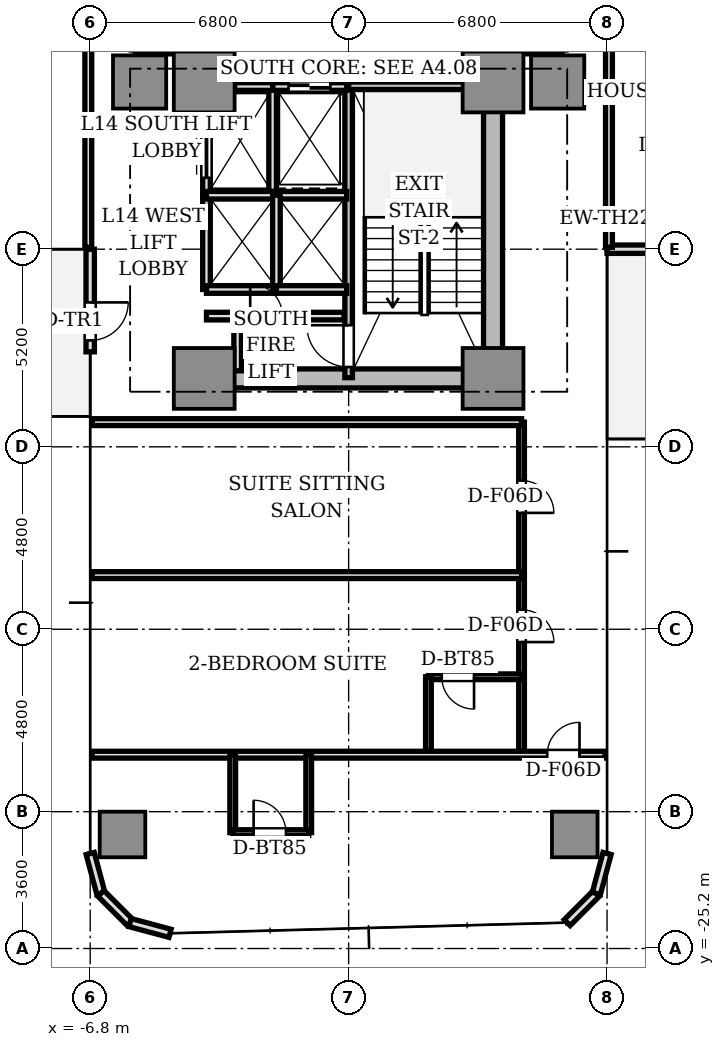
"""IFC4 building model, lengths in metres.
Left out: names, types, materials, properties, quantities, classifications, styles, units other than length and angle.
Written with IfcOpenShell. Run it as: python <this file> out.ifc"""

import sys

from ifc_helpers import new_model, si_unit, direction, frame, frame_2d, origin, origin_2d, place, context, subcontext, project, spatial, rectangle, extrude, source, transform, mapped, element, fill, save


model = new_model("IFC4")
c1 = context("Model", 3, precision=1e-05, world=origin(), true_north=direction((0.0, 1.0)))
c2 = subcontext(c1, "Body", "Model", "MODEL_VIEW")
j1 = project(units=[si_unit("LENGTHUNIT", "METRE"), si_unit("PLANEANGLEUNIT", "RADIAN")], contexts=[c1])
p1 = place(None, origin())
s1 = spatial("IfcSite", under=j1, at=p1, CompositionType="ELEMENT")
p2 = place(p1, origin())
s2 = spatial("IfcBuilding", under=s1, at=p2, CompositionType="ELEMENT")
p3 = place(p2, frame((0.0, 0.0, 54.4)))
s3 = spatial("IfcBuildingStorey", under=s2, at=p3, CompositionType="ELEMENT", Elevation=54.4)
p4 = place(p3, frame((-3.55, -10.2, 0.0), z_axis=(0.0, 0.0, 1.0), x_axis=(1.0, 0.0, 0.0)))
e1 = element("IfcWall", 1, at=p4, inside=s3, PredefinedType="SHEAR", context=c2, shape_type="SweptSolid", body=[
    extrude(rectangle(XDim=7.1, YDim=0.5, at=frame_2d((3.55, 0.0))), origin(), (0.0, 0.0, 1.0), 3.11),
])
p5 = place(p3, frame((3.8, -9.75, 0.0), z_axis=(0.0, 0.0, 1.0), x_axis=(0.0, 1.0, 0.0)))
e2 = element("IfcWall", 2, at=p5, inside=s3, PredefinedType="SHEAR", context=c2, shape_type="SweptSolid", body=[
    extrude(rectangle(XDim=6.9, YDim=0.5, at=frame_2d((3.45, 0.0))), origin(), (0.0, 0.0, 1.0), 3.11),
])
m1 = source(origin(), c2, "Body", "SweptSolid", [
    extrude(rectangle(XDim=1.6, YDim=1.6, at=origin_2d()), origin(), (0.0, 0.0, 1.0), 3.11),
])
for number, where, z_axis, x_axis in (
    (3, (-3.8, -2.4, 0.0), (0.0, 0.0, 1.0), (1.0, 0.0, 0.0)),
    (4, (3.8, -2.4, 0.0), (0.0, 0.0, 1.0), (1.0, 0.0, 0.0)),
    (5, (-3.8, -10.2, 0.0), (0.0, 0.0, 1.0), (1.0, 0.0, 0.0)),
    (6, (3.8, -10.2, 0.0), (0.0, 0.0, 1.0), (1.0, 0.0, 0.0)),
):
    element("IfcColumn", number, at=place(p3, frame(where, z_axis=z_axis, x_axis=x_axis)), inside=s3, PredefinedType="COLUMN", context=c2, shape_type="MappedRepresentation", body=[
        mapped(m1, transform((0.0, 0.0, 0.0), scale=1.0)),
    ])
m2 = source(origin(), c2, "Body", "SweptSolid", [
    extrude(rectangle(XDim=1.4, YDim=1.4, at=origin_2d()), origin(), (0.0, 0.0, 1.0), 3.11),
])
for number, where, z_axis, x_axis in (
    (7, (5.5, -2.4, 0.0), (0.0, 0.0, 1.0), (1.0, 0.0, 0.0)),
    (8, (-5.5, -2.4, 0.0), (0.0, 0.0, 1.0), (1.0, 0.0, 0.0)),
):
    element("IfcColumn", number, at=place(p3, frame(where, z_axis=z_axis, x_axis=x_axis)), inside=s3, PredefinedType="COLUMN", context=c2, shape_type="MappedRepresentation", body=[
        mapped(m2, transform((0.0, 0.0, 0.0), scale=1.0)),
    ])
m3 = source(origin(), c2, "Body", "SweptSolid", [
    extrude(rectangle(XDim=1.2, YDim=1.2, at=origin_2d()), origin(), (0.0, 0.0, 1.0), 3.11),
])
for number, where, z_axis, x_axis in (
    (9, (-5.95, -22.2, 0.0), (0.0, 0.0, 1.0), (1.0, 0.0, 0.0)),
    (10, (5.95, -22.2, 0.0), (0.0, 0.0, 1.0), (1.0, 0.0, 0.0)),
):
    element("IfcColumn", number, at=place(p3, frame(where, z_axis=z_axis, x_axis=x_axis)), inside=s3, PredefinedType="COLUMN", context=c2, shape_type="MappedRepresentation", body=[
        mapped(m3, transform((0.0, 0.0, 0.0), scale=1.0)),
    ])
p6 = place(p3, frame((6.8, -6.8, 0.0), z_axis=(0.0, 0.0, 1.0), x_axis=(1.0, 0.0, 0.0)))
e11 = element("IfcWall", 11, at=p6, inside=s3, PredefinedType="STANDARD", context=c2, shape_type="SweptSolid", body=[
    extrude(rectangle(XDim=2.7, YDim=0.22, at=frame_2d((1.35, 0.0))), origin(), (0.0, 0.0, 1.0), 3.11),
])
p7 = place(p6, frame((1.4, 0.0, 0.0)))
e12 = element("IfcOpeningElement", 12, at=p7, cuts=e11, PredefinedType="OPENING", context=c2, shape_type="SweptSolid", body=[
    extrude(rectangle(XDim=1.0, YDim=2.2, at=frame_2d((0.5, 1.1))), frame((0.0, 0.12, 0.0), z_axis=(0.0, -1.0, 0.0), x_axis=(1.0, 0.0, 0.0)), (0.0, 0.0, 1.0), 0.24),
])
p8 = place(p3, frame((-6.8, -6.8, 0.0), z_axis=(0.0, 0.0, 1.0), x_axis=(0.0, -1.0, 0.0)))
e13 = element("IfcWall", 13, at=p8, inside=s3, PredefinedType="STANDARD", context=c2, shape_type="SweptSolid", body=[
    extrude(rectangle(XDim=2.7, YDim=0.22, at=frame_2d((1.35, 0.0))), origin(), (0.0, 0.0, 1.0), 3.11),
])
p9 = place(p8, frame((1.4, 0.0, 0.0)))
e14 = element("IfcOpeningElement", 14, at=p9, cuts=e13, PredefinedType="OPENING", context=c2, shape_type="SweptSolid", body=[
    extrude(rectangle(XDim=1.0, YDim=2.2, at=frame_2d((0.5, 1.1))), frame((0.0, 0.12, 0.0), z_axis=(0.0, -1.0, 0.0), x_axis=(1.0, 0.0, 0.0)), (0.0, 0.0, 1.0), 0.24),
])
for number, where, z_axis, x_axis in (
    (15, (-6.8, -22.7, 0.0), (0.0, 0.0, 1.0), (0.259, -0.966, 0.0)),
    (16, (-6.519, -23.75, 0.0), (0.0, 0.0, 1.0), (0.707, -0.707, 0.0)),
    (17, (-5.75, -24.519, 0.0), (0.0, 0.0, 1.0), (0.966, -0.259, 0.0)),
    (18, (5.75, -24.519, 0.0), (0.0, 0.0, 1.0), (0.707, 0.707, 0.0)),
    (19, (6.519, -23.75, 0.0), (0.0, 0.0, 1.0), (0.259, 0.966, 0.0)),
):
    element("IfcWall", number, at=place(p3, frame(where, z_axis=z_axis, x_axis=x_axis)), inside=s3, PredefinedType="STANDARD", context=c2, shape_type="SweptSolid", body=[
        extrude(rectangle(XDim=1.087, YDim=0.22, at=frame_2d((0.543, 0.0))), origin(), (0.0, 0.0, 1.0), 3.11),
    ])
p10 = place(p3, frame((0.0, -10.18, 0.0), z_axis=(0.0, 0.0, 1.0), x_axis=(0.0, 1.0, 0.0)))
e20 = element("IfcWall", 20, at=p10, inside=s3, PredefinedType="SOLIDWALL", context=c2, shape_type="SweptSolid", body=[
    extrude(rectangle(XDim=7.68, YDim=0.2, at=frame_2d((3.84, 0.0))), origin(), (0.0, 0.0, 1.0), 3.11),
])
p11 = place(p10, frame((0.28, 0.0, 0.0)))
e21 = element("IfcOpeningElement", 21, at=p11, cuts=e20, PredefinedType="OPENING", context=c2, shape_type="SweptSolid", body=[
    extrude(rectangle(XDim=1.1, YDim=2.15, at=frame_2d((0.55, 1.075))), frame((0.0, 0.11, 0.0), z_axis=(0.0, -1.0, 0.0), x_axis=(1.0, 0.0, 0.0)), (0.0, 0.0, 1.0), 0.22),
])
p12 = place(p3, frame((0.0, -2.5, 0.0), z_axis=(0.0, 0.0, 1.0), x_axis=(1.0, 0.0, 0.0)))
e22 = element("IfcWall", 22, at=p12, inside=s3, PredefinedType="SOLIDWALL", context=c2, shape_type="SweptSolid", body=[
    extrude(rectangle(XDim=3.72, YDim=0.2, at=frame_2d((1.86, 0.0))), origin(), (0.0, 0.0, 1.0), 3.11),
])
p13 = place(p3, frame((-2.0, -5.28, 0.0), z_axis=(0.0, 0.0, 1.0), x_axis=(0.0, 1.0, 0.0)))
e23 = element("IfcWall", 23, at=p13, inside=s3, PredefinedType="SOLIDWALL", context=c2, shape_type="SweptSolid", body=[
    extrude(rectangle(XDim=2.78, YDim=0.2, at=frame_2d((1.39, 0.0))), origin(), (0.0, 0.0, 1.0), 2.66),
])
p14 = place(p3, frame((-2.0, -2.52, 0.0), z_axis=(0.0, 0.0, 1.0), x_axis=(1.0, 0.0, 0.0)))
e24 = element("IfcWall", 24, at=p14, inside=s3, PredefinedType="SOLIDWALL", context=c2, shape_type="SweptSolid", body=[
    extrude(rectangle(XDim=1.95, YDim=0.2, at=frame_2d((0.975, 0.0))), origin(), (0.0, 0.0, 1.0), 2.66),
])
p15 = place(p14, frame((0.42, 0.0, 0.0)))
e25 = element("IfcOpeningElement", 25, at=p15, cuts=e24, PredefinedType="OPENING", context=c2, shape_type="SweptSolid", body=[
    extrude(rectangle(XDim=1.1, YDim=2.2, at=frame_2d((0.55, 1.1))), frame((0.0, 0.11, 0.0), z_axis=(0.0, -1.0, 0.0), x_axis=(1.0, 0.0, 0.0)), (0.0, 0.0, 1.0), 0.22),
])
p16 = place(p3, frame((-3.0, -2.52, 0.0), z_axis=(0.0, 0.0, 1.0), x_axis=(1.0, 0.0, 0.0)))
e26 = element("IfcWall", 26, at=p16, inside=s3, PredefinedType="SOLIDWALL", context=c2, shape_type="SweptSolid", body=[
    extrude(rectangle(XDim=1.0, YDim=0.2, at=frame_2d((0.5, 0.0))), origin(), (0.0, 0.0, 1.0), 2.66),
])
p17 = place(p3, frame((-3.74, -5.36, 0.0), z_axis=(0.0, 0.0, 1.0), x_axis=(0.0, 1.0, 0.0)))
e27 = element("IfcWall", 27, at=p17, inside=s3, PredefinedType="SOLIDWALL", context=c2, shape_type="SweptSolid", body=[
    extrude(rectangle(XDim=2.08, YDim=0.2, at=frame_2d((1.04, 0.0))), origin(), (0.0, 0.0, 1.0), 2.66),
])
p18 = place(p17, frame((0.44, 0.0, 0.0)))
e28 = element("IfcOpeningElement", 28, at=p18, cuts=e27, PredefinedType="OPENING", context=c2, shape_type="SweptSolid", body=[
    extrude(rectangle(XDim=1.2, YDim=2.2, at=frame_2d((0.6, 1.1))), frame((0.0, 0.11, 0.0), z_axis=(0.0, -1.0, 0.0), x_axis=(1.0, 0.0, 0.0)), (0.0, 0.0, 1.0), 0.22),
])
p19 = place(p3, frame((-3.74, -7.86, 0.0), z_axis=(0.0, 0.0, 1.0), x_axis=(0.0, 1.0, 0.0)))
e29 = element("IfcWall", 29, at=p19, inside=s3, PredefinedType="SOLIDWALL", context=c2, shape_type="SweptSolid", body=[
    extrude(rectangle(XDim=2.48, YDim=0.2, at=frame_2d((1.24, 0.0))), origin(), (0.0, 0.0, 1.0), 2.66),
])
p20 = place(p3, frame((-3.74, -7.86, 0.0), z_axis=(0.0, 0.0, 1.0), x_axis=(1.0, 0.0, 0.0)))
e30 = element("IfcWall", 30, at=p20, inside=s3, PredefinedType="SOLIDWALL", context=c2, shape_type="SweptSolid", body=[
    extrude(rectangle(XDim=1.84, YDim=0.2, at=frame_2d((0.92, 0.0))), origin(), (0.0, 0.0, 1.0), 2.66),
])
p21 = place(p3, frame((-3.74, -5.38, 0.0), z_axis=(0.0, 0.0, 1.0), x_axis=(1.0, 0.0, 0.0)))
e31 = element("IfcWall", 31, at=p21, inside=s3, PredefinedType="SOLIDWALL", context=c2, shape_type="SweptSolid", body=[
    extrude(rectangle(XDim=3.69, YDim=0.2, at=frame_2d((1.845, 0.0))), origin(), (0.0, 0.0, 1.0), 2.66),
])
p22 = place(p3, frame((-1.9, -7.86, 0.0), z_axis=(0.0, 0.0, 1.0), x_axis=(0.0, 1.0, 0.0)))
e32 = element("IfcWall", 32, at=p22, inside=s3, PredefinedType="SOLIDWALL", context=c2, shape_type="SweptSolid", body=[
    extrude(rectangle(XDim=2.48, YDim=0.2, at=frame_2d((1.24, 0.0))), origin(), (0.0, 0.0, 1.0), 2.66),
])
p23 = place(p3, frame((-1.9, -7.86, 0.0), z_axis=(0.0, 0.0, 1.0), x_axis=(1.0, 0.0, 0.0)))
e33 = element("IfcWall", 33, at=p23, inside=s3, PredefinedType="SOLIDWALL", context=c2, shape_type="SweptSolid", body=[
    extrude(rectangle(XDim=1.85, YDim=0.2, at=frame_2d((0.925, 0.0))), origin(), (0.0, 0.0, 1.0), 2.66),
])
for number, where, z_axis, x_axis in (
    (34, (3.98, -1.56, 0.0), (0.0, 0.0, 1.0), (1.0, 0.0, 0.0)),
    (35, (-5.62, -1.56, 0.0), (0.0, 0.0, 1.0), (1.0, 0.0, 0.0)),
):
    element("IfcWall", number, at=place(p3, frame(where, z_axis=z_axis, x_axis=x_axis)), inside=s3, PredefinedType="SOLIDWALL", context=c2, shape_type="SweptSolid", body=[
        extrude(rectangle(XDim=1.64, YDim=0.2, at=frame_2d((0.82, 0.0))), origin(), (0.0, 0.0, 1.0), 2.66),
    ])
p24 = place(p3, frame((-3.74, -8.56, 0.0), z_axis=(0.0, 0.0, 1.0), x_axis=(1.0, 0.0, 0.0)))
e36 = element("IfcWall", 36, at=p24, inside=s3, PredefinedType="SOLIDWALL", context=c2, shape_type="SweptSolid", body=[
    extrude(rectangle(XDim=3.62, YDim=0.2, at=frame_2d((1.81, 0.0))), origin(), (0.0, 0.0, 1.0), 2.66),
])
p25 = place(p24, frame((1.15, 0.0, 0.0)))
e37 = element("IfcOpeningElement", 37, at=p25, cuts=e36, PredefinedType="OPENING", context=c2, shape_type="SweptSolid", body=[
    extrude(rectangle(XDim=0.85, YDim=2.1, at=frame_2d((0.425, 1.05))), frame((0.0, 0.11, 0.0), z_axis=(0.0, -1.0, 0.0), x_axis=(1.0, 0.0, 0.0)), (0.0, 0.0, 1.0), 0.22),
])
p26 = place(p3, frame((-2.92, -10.0, 0.0), z_axis=(0.0, 0.0, 1.0), x_axis=(0.0, 1.0, 0.0)))
e38 = element("IfcWall", 38, at=p26, inside=s3, PredefinedType="SOLIDWALL", context=c2, shape_type="SweptSolid", body=[
    extrude(rectangle(XDim=1.44, YDim=0.2, at=frame_2d((0.72, 0.0))), origin(), (0.0, 0.0, 1.0), 2.66),
])
for number, where, z_axis, x_axis in (
    (39, (6.85, -6.75, 0.0), (0.0, 0.0, 1.0), (0.0, 1.0, 0.0)),
    (40, (-6.85, -0.95, 0.0), (0.0, 0.0, 1.0), (0.0, -1.0, 0.0)),
):
    element("IfcWall", number, at=place(p3, frame(where, z_axis=z_axis, x_axis=x_axis)), inside=s3, PredefinedType="PARTITIONING", context=c2, shape_type="SweptSolid", body=[
        extrude(rectangle(XDim=5.8, YDim=0.18, at=frame_2d((2.9, 0.0))), origin(), (0.0, 0.0, 1.0), 2.66),
    ])
p27 = place(p3, frame((4.55, -11.35, 0.0), z_axis=(0.0, 0.0, 1.0), x_axis=(0.0, -1.0, 0.0)))
e41 = element("IfcWall", 41, at=p27, inside=s3, PredefinedType="PARTITIONING", context=c2, shape_type="SweptSolid", body=[
    extrude(rectangle(XDim=8.75, YDim=0.15, at=frame_2d((4.375, 0.0))), origin(), (0.0, 0.0, 1.0), 2.63),
])
p28 = place(p27, frame((1.538, 0.0, 0.0)))
e42 = element("IfcOpeningElement", 42, at=p28, cuts=e41, PredefinedType="OPENING", context=c2, shape_type="SweptSolid", body=[
    extrude(rectangle(XDim=0.85, YDim=2.1, at=frame_2d((0.425, 1.05))), frame((0.0, 0.085, 0.0), z_axis=(0.0, -1.0, 0.0), x_axis=(1.0, 0.0, 0.0)), (0.0, 0.0, 1.0), 0.17),
])
p29 = place(p27, frame((4.937, 0.0, 0.0)))
e43 = element("IfcOpeningElement", 43, at=p29, cuts=e41, PredefinedType="OPENING", context=c2, shape_type="SweptSolid", body=[
    extrude(rectangle(XDim=0.85, YDim=2.1, at=frame_2d((0.425, 1.05))), frame((0.0, 0.085, 0.0), z_axis=(0.0, -1.0, 0.0), x_axis=(1.0, 0.0, 0.0)), (0.0, 0.0, 1.0), 0.17),
])
for number, where, z_axis, x_axis in (
    (44, (-6.75, -11.35, 0.0), (0.0, 0.0, 1.0), (1.0, 0.0, 0.0)),
    (45, (4.55, -15.375, 0.0), (0.0, 0.0, 1.0), (-1.0, 0.0, 0.0)),
):
    element("IfcWall", number, at=place(p3, frame(where, z_axis=z_axis, x_axis=x_axis)), inside=s3, PredefinedType="PARTITIONING", context=c2, shape_type="SweptSolid", body=[
        extrude(rectangle(XDim=11.3, YDim=0.18, at=frame_2d((5.65, 0.0))), origin(), (0.0, 0.0, 1.0), 2.66),
    ])
p30 = place(p3, frame((4.55, -18.05, 0.0), z_axis=(0.0, 0.0, 1.0), x_axis=(-1.0, 0.0, 0.0)))
e46 = element("IfcWall", 46, at=p30, inside=s3, PredefinedType="PARTITIONING", context=c2, shape_type="SweptSolid", body=[
    extrude(rectangle(XDim=2.45, YDim=0.15, at=frame_2d((1.225, 0.0))), origin(), (0.0, 0.0, 1.0), 2.66),
])
p31 = place(p30, frame((1.25, 0.0, 0.0)))
e47 = element("IfcOpeningElement", 47, at=p31, cuts=e46, PredefinedType="OPENING", context=c2, shape_type="SweptSolid", body=[
    extrude(rectangle(XDim=0.85, YDim=2.1, at=frame_2d((0.425, 1.05))), frame((0.0, 0.085, 0.0), z_axis=(0.0, -1.0, 0.0), x_axis=(1.0, 0.0, 0.0)), (0.0, 0.0, 1.0), 0.17),
])
p32 = place(p3, frame((2.1, -18.05, 0.0), z_axis=(0.0, 0.0, 1.0), x_axis=(0.0, -1.0, 0.0)))
e48 = element("IfcWall", 48, at=p32, inside=s3, PredefinedType="PARTITIONING", context=c2, shape_type="SweptSolid", body=[
    extrude(rectangle(XDim=2.05, YDim=0.15, at=frame_2d((1.025, 0.0))), origin(), (0.0, 0.0, 1.0), 2.66),
])
p33 = place(p3, frame((-6.75, -20.1, 0.0), z_axis=(0.0, 0.0, 1.0), x_axis=(1.0, 0.0, 0.0)))
e49 = element("IfcWall", 49, at=p33, inside=s3, PredefinedType="PARTITIONING", context=c2, shape_type="SweptSolid", body=[
    extrude(rectangle(XDim=13.5, YDim=0.18, at=frame_2d((6.75, 0.0))), origin(), (0.0, 0.0, 1.0), 2.66),
])
p34 = place(p33, frame((11.975, 0.0, 0.0)))
e50 = element("IfcOpeningElement", 50, at=p34, cuts=e49, PredefinedType="OPENING", context=c2, shape_type="SweptSolid", body=[
    extrude(rectangle(XDim=0.85, YDim=2.1, at=frame_2d((0.425, 1.05))), frame((0.0, 0.1, 0.0), z_axis=(0.0, -1.0, 0.0), x_axis=(1.0, 0.0, 0.0)), (0.0, 0.0, 1.0), 0.2),
])
for number, where, z_axis, x_axis in (
    (51, (-1.05, -20.1, 0.0), (0.0, 0.0, 1.0), (0.0, -1.0, 0.0)),
    (52, (-3.05, -20.1, 0.0), (0.0, 0.0, 1.0), (0.0, -1.0, 0.0)),
):
    element("IfcWall", number, at=place(p3, frame(where, z_axis=z_axis, x_axis=x_axis)), inside=s3, PredefinedType="PARTITIONING", context=c2, shape_type="SweptSolid", body=[
        extrude(rectangle(XDim=2.05, YDim=0.15, at=frame_2d((1.025, 0.0))), origin(), (0.0, 0.0, 1.0), 2.66),
    ])
p35 = place(p3, frame((-3.05, -22.15, 0.0), z_axis=(0.0, 0.0, 1.0), x_axis=(1.0, 0.0, 0.0)))
e53 = element("IfcWall", 53, at=p35, inside=s3, PredefinedType="PARTITIONING", context=c2, shape_type="SweptSolid", body=[
    extrude(rectangle(XDim=2.0, YDim=0.15, at=frame_2d((1.0, 0.0))), origin(), (0.0, 0.0, 1.0), 2.58),
])
p36 = place(p35, frame((0.55, 0.0, 0.0)))
e54 = element("IfcOpeningElement", 54, at=p36, cuts=e53, PredefinedType="OPENING", context=c2, shape_type="SweptSolid", body=[
    extrude(rectangle(XDim=0.85, YDim=2.1, at=frame_2d((0.425, 1.05))), frame((0.0, 0.085, 0.0), z_axis=(0.0, -1.0, 0.0), x_axis=(1.0, 0.0, 0.0)), (0.0, 0.0, 1.0), 0.17),
])
m4 = source(origin(), c2, "Body", "SweptSolid", [
    extrude(rectangle(XDim=1.0, YDim=0.05, at=origin_2d()), origin(), (0.0, 0.0, 1.0), 2.2),
])
p37 = place(p9, frame((0.5, 0.0, 0.0)))
e55 = element("IfcDoor", 55, at=p37, inside=s3, OperationType="SINGLE_SWING_LEFT", PredefinedType="DOOR", context=c2, shape_type="MappedRepresentation", body=[
    mapped(m4, transform((0.0, 0.0, 0.0), scale=1.0)),
])
fill(e14, e55)
m5 = source(origin(), c2, "Body", "SweptSolid", [
    extrude(rectangle(XDim=1.1, YDim=0.05, at=origin_2d()), origin(), (0.0, 0.0, 1.0), 2.2),
])
p38 = place(p15, frame((0.55, 0.0, 0.0)))
e56 = element("IfcDoor", 56, at=p38, inside=s3, OperationType="DOUBLE_DOOR_SLIDING", PredefinedType="DOOR", context=c2, shape_type="MappedRepresentation", body=[
    mapped(m5, transform((0.0, 0.0, 0.0), scale=1.0)),
])
fill(e25, e56)
m6 = source(origin(), c2, "Body", "SweptSolid", [
    extrude(rectangle(XDim=1.2, YDim=0.05, at=origin_2d()), origin(), (0.0, 0.0, 1.0), 2.2),
])
p39 = place(p18, frame((0.6, 0.0, 0.0)))
e57 = element("IfcDoor", 57, at=p39, inside=s3, OperationType="DOUBLE_DOOR_SLIDING", PredefinedType="DOOR", context=c2, shape_type="MappedRepresentation", body=[
    mapped(m6, transform((0.0, 0.0, 0.0), scale=1.0)),
])
fill(e28, e57)
m7 = source(origin(), c2, "Body", "SweptSolid", [
    extrude(rectangle(XDim=1.1, YDim=0.05, at=origin_2d()), origin(), (0.0, 0.0, 1.0), 2.15),
])
p40 = place(p11, frame((0.55, 0.0, 0.0)))
e58 = element("IfcDoor", 58, at=p40, inside=s3, OperationType="SINGLE_SWING_RIGHT", PredefinedType="DOOR", context=c2, shape_type="MappedRepresentation", body=[
    mapped(m7, transform((0.0, 0.0, 0.0), scale=1.0)),
])
fill(e21, e58)
m8 = source(origin(), c2, "Body", "SweptSolid", [
    extrude(rectangle(XDim=0.85, YDim=0.05, at=origin_2d()), origin(), (0.0, 0.0, 1.0), 2.1),
])
p41 = place(p25, frame((0.425, 0.0, 0.0)))
e59 = element("IfcDoor", 59, at=p41, inside=s3, OperationType="SINGLE_SWING_LEFT", PredefinedType="DOOR", context=c2, shape_type="MappedRepresentation", body=[
    mapped(m8, transform((0.0, 0.0, 0.0), scale=1.0)),
])
fill(e37, e59)
p42 = place(p28, frame((0.425, 0.0, 0.0)))
e60 = element("IfcDoor", 60, at=p42, inside=s3, OperationType="SINGLE_SWING_RIGHT", PredefinedType="DOOR", context=c2, shape_type="MappedRepresentation", body=[
    mapped(m8, transform((0.0, 0.0, 0.0), scale=1.0)),
])
fill(e42, e60)
p43 = place(p31, frame((0.425, 0.0, 0.0)))
e61 = element("IfcDoor", 61, at=p43, inside=s3, OperationType="SINGLE_SWING_LEFT", PredefinedType="DOOR", context=c2, shape_type="MappedRepresentation", body=[
    mapped(m8, transform((0.0, 0.0, 0.0), scale=1.0)),
])
fill(e47, e61)
p44 = place(p29, frame((0.425, 0.0, 0.0)))
e62 = element("IfcDoor", 62, at=p44, inside=s3, OperationType="SINGLE_SWING_RIGHT", PredefinedType="DOOR", context=c2, shape_type="MappedRepresentation", body=[
    mapped(m8, transform((0.0, 0.0, 0.0), scale=1.0)),
])
fill(e43, e62)
p45 = place(p36, frame((0.425, 0.0, 0.0)))
e63 = element("IfcDoor", 63, at=p45, inside=s3, OperationType="SINGLE_SWING_LEFT", PredefinedType="DOOR", context=c2, shape_type="MappedRepresentation", body=[
    mapped(m8, transform((0.0, 0.0, 0.0), scale=1.0)),
])
fill(e54, e63)
p46 = place(p34, frame((0.425, 0.0, 0.0)))
e64 = element("IfcDoor", 64, at=p46, inside=s3, OperationType="SINGLE_SWING_RIGHT", PredefinedType="DOOR", context=c2, shape_type="MappedRepresentation", body=[
    mapped(m8, transform((0.0, 0.0, 0.0), scale=1.0)),
])
fill(e50, e64)
save(model, sys.argv[1])
